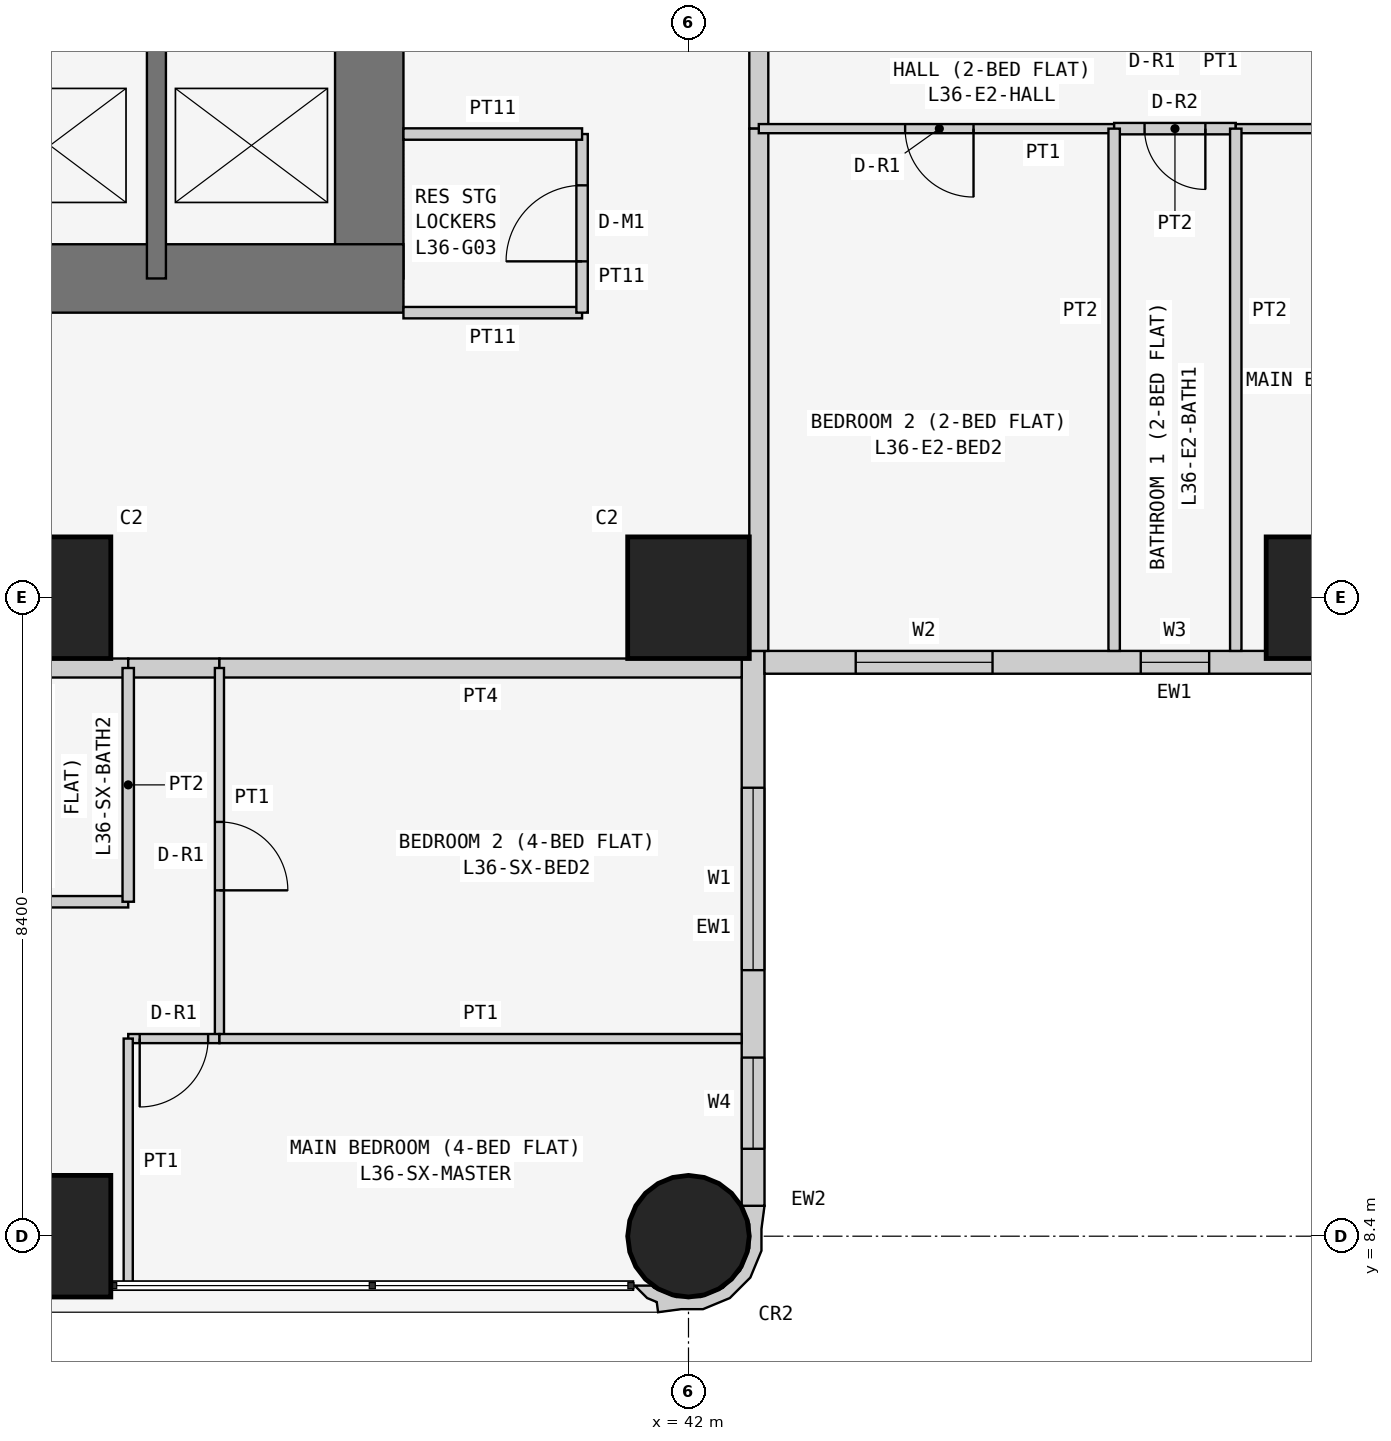
"""IFC4 building model, lengths in metres.
Left out: names, types, materials, properties, quantities, classifications, styles, units other than length and angle.
Written with IfcOpenShell. Run it as: python <this file> out.ifc"""

import sys

from ifc_helpers import new_model, si_unit, direction, frame, frame_2d, origin, origin_2d, place, context, subcontext, project, spatial, polyline, rectangle, circle, outline, extrude, element, fill, save


model = new_model("IFC4")
c1 = context("Model", 3, precision=1e-05, world=origin(), true_north=direction((0.0, 1.0)))
c2 = subcontext(c1, "Body", "Model", "MODEL_VIEW")
j1 = project(units=[si_unit("LENGTHUNIT", "METRE"), si_unit("PLANEANGLEUNIT", "RADIAN")], contexts=[c1])
p1 = place(None, origin())
s1 = spatial("IfcSite", under=j1, at=p1, CompositionType="ELEMENT")
p2 = place(p1, origin())
s2 = spatial("IfcBuilding", under=s1, at=p2, CompositionType="ELEMENT")
p3 = place(p2, frame((0.0, 0.0, 141.3)))
s3 = spatial("IfcBuildingStorey", under=s2, at=p3, CompositionType="ELEMENT", Elevation=141.3)
for number, where, z_axis, x_axis in (
    (1, (33.6, 8.4, 0.0), (0.0, 0.0, 1.0), (1.0, 0.0, 0.0)),
    (2, (33.6, 16.8, 0.0), (0.0, 0.0, 1.0), (1.0, 0.0, 0.0)),
):
    element("IfcColumn", number, at=place(p3, frame(where, z_axis=z_axis, x_axis=x_axis)), inside=s3, PredefinedType="COLUMN", context=c2, shape_type="SweptSolid", body=[
        extrude(rectangle(XDim=1.6, YDim=1.6, at=origin_2d()), origin(), (0.0, 0.0, 1.0), 3.6),
    ])
p4 = place(p3, frame((42.0, 8.4, 0.0), z_axis=(0.0, 0.0, 1.0), x_axis=(1.0, 0.0, 0.0)))
e3 = element("IfcColumn", 3, at=p4, inside=s3, PredefinedType="COLUMN", context=c2, shape_type="SweptSolid", body=[
    extrude(circle(Radius=0.8, at=origin_2d()), origin(), (0.0, 0.0, 1.0), 3.6),
])
for number, where, z_axis, x_axis in (
    (4, (42.0, 16.8, 0.0), (0.0, 0.0, 1.0), (1.0, 0.0, 0.0)),
    (5, (50.4, 16.8, 0.0), (0.0, 0.0, 1.0), (1.0, 0.0, 0.0)),
):
    element("IfcColumn", number, at=place(p3, frame(where, z_axis=z_axis, x_axis=x_axis)), inside=s3, PredefinedType="COLUMN", context=c2, shape_type="SweptSolid", body=[
        extrude(rectangle(XDim=1.6, YDim=1.6, at=origin_2d()), origin(), (0.0, 0.0, 1.0), 3.6),
    ])
p5 = place(p3, frame((21.0, 21.0, 0.0), z_axis=(0.0, 0.0, 1.0), x_axis=(1.0, 0.0, 0.0)))
e6 = element("IfcWall", 6, at=p5, inside=s3, PredefinedType="SHEAR", context=c2, shape_type="SweptSolid", body=[
    extrude(rectangle(XDim=17.25, YDim=0.9, at=frame_2d((8.625, 0.0))), origin(), (0.0, 0.0, 1.0), 3.6),
])
p6 = place(p3, frame((37.8, 21.0, 0.0), z_axis=(0.0, 0.0, 1.0), x_axis=(0.0, 1.0, 0.0)))
e7 = element("IfcWall", 7, at=p6, inside=s3, PredefinedType="SHEAR", context=c2, shape_type="SweptSolid", body=[
    extrude(rectangle(XDim=17.25, YDim=0.9, at=frame_2d((8.625, 0.0))), origin(), (0.0, 0.0, 1.0), 3.6),
])
p7 = place(p6, frame((5.2, 0.0, 0.0)))
e8 = element("IfcOpeningElement", 8, at=p7, cuts=e7, PredefinedType="OPENING", context=c2, shape_type="SweptSolid", body=[
    extrude(rectangle(XDim=1.2, YDim=2.1, at=frame_2d((0.6, 1.05))), frame((0.0, 0.46, 0.0), z_axis=(0.0, -1.0, 0.0), x_axis=(1.0, 0.0, 0.0)), (0.0, 0.0, 1.0), 0.92),
])
p8 = place(p3, frame((35.0, 21.0, 0.0), z_axis=(0.0, 0.0, 1.0), x_axis=(0.0, 1.0, 0.0)))
e9 = element("IfcWall", 9, at=p8, inside=s3, PredefinedType="SHEAR", context=c2, shape_type="SweptSolid", body=[
    extrude(rectangle(XDim=3.2, YDim=0.25, at=frame_2d((1.6, 0.0))), origin(), (0.0, 0.0, 1.0), 3.6),
])
p9 = place(p3, frame((42.85, 8.8, 0.0), z_axis=(0.0, 0.0, 1.0), x_axis=(0.0, 1.0, 0.0)))
e10 = element("IfcWall", 10, at=p9, inside=s3, PredefinedType="SOLIDWALL", context=c2, shape_type="SweptSolid", body=[
    extrude(rectangle(XDim=7.3, YDim=0.3, at=frame_2d((3.65, 0.0))), origin(), (0.0, 0.0, 1.0), 3.45),
])
p10 = place(p9, frame((3.1, 0.0, 0.9)))
e11 = element("IfcOpeningElement", 11, at=p10, cuts=e10, PredefinedType="OPENING", context=c2, shape_type="SweptSolid", body=[
    extrude(rectangle(XDim=2.4, YDim=1.5, at=frame_2d((1.2, 0.75))), frame((0.0, 0.16, 0.0), z_axis=(0.0, -1.0, 0.0), x_axis=(1.0, 0.0, 0.0)), (0.0, 0.0, 1.0), 0.32),
])
p11 = place(p9, frame((0.75, 0.0, 0.9)))
e12 = element("IfcOpeningElement", 12, at=p11, cuts=e10, PredefinedType="OPENING", context=c2, shape_type="SweptSolid", body=[
    extrude(rectangle(XDim=1.2, YDim=1.5, at=frame_2d((0.6, 0.75))), frame((0.0, 0.16, 0.0), z_axis=(0.0, -1.0, 0.0), x_axis=(1.0, 0.0, 0.0)), (0.0, 0.0, 1.0), 0.32),
])
p12 = place(p3, frame((43.0, 15.95, 0.0), z_axis=(0.0, 0.0, 1.0), x_axis=(1.0, 0.0, 0.0)))
e13 = element("IfcWall", 13, at=p12, inside=s3, PredefinedType="SOLIDWALL", context=c2, shape_type="SweptSolid", body=[
    extrude(rectangle(XDim=15.4, YDim=0.3, at=frame_2d((7.7, 0.0))), origin(), (0.0, 0.0, 1.0), 3.45),
])
p13 = place(p12, frame((1.2, 0.0, 0.9)))
e14 = element("IfcOpeningElement", 14, at=p13, cuts=e13, PredefinedType="OPENING", context=c2, shape_type="SweptSolid", body=[
    extrude(rectangle(XDim=1.8, YDim=1.5, at=frame_2d((0.9, 0.75))), frame((0.0, 0.16, 0.0), z_axis=(0.0, -1.0, 0.0), x_axis=(1.0, 0.0, 0.0)), (0.0, 0.0, 1.0), 0.32),
])
p14 = place(p12, frame((4.95, 0.0, 1.5)))
e15 = element("IfcOpeningElement", 15, at=p14, cuts=e13, PredefinedType="OPENING", context=c2, shape_type="SweptSolid", body=[
    extrude(rectangle(XDim=0.9, YDim=0.7, at=frame_2d((0.45, 0.35))), frame((0.0, 0.16, 0.0), z_axis=(0.0, -1.0, 0.0), x_axis=(1.0, 0.0, 0.0)), (0.0, 0.0, 1.0), 0.32),
])
p15 = place(p12, frame((8.5, 0.0, 0.9)))
e16 = element("IfcOpeningElement", 16, at=p15, cuts=e13, PredefinedType="OPENING", context=c2, shape_type="SweptSolid", body=[
    extrude(rectangle(XDim=1.8, YDim=1.5, at=frame_2d((0.9, 0.75))), frame((0.0, 0.16, 0.0), z_axis=(0.0, -1.0, 0.0), x_axis=(1.0, 0.0, 0.0)), (0.0, 0.0, 1.0), 0.32),
])
p16 = place(p12, frame((12.5, 0.0, 0.0)))
e17 = element("IfcOpeningElement", 17, at=p16, cuts=e13, PredefinedType="OPENING", context=c2, shape_type="SweptSolid", body=[
    extrude(rectangle(XDim=0.9, YDim=2.4, at=frame_2d((0.45, 1.2))), frame((0.0, 0.16, 0.0), z_axis=(0.0, -1.0, 0.0), x_axis=(1.0, 0.0, 0.0)), (0.0, 0.0, 1.0), 0.32),
])
p17 = place(p12, frame((13.5, 0.0, 0.9)))
e18 = element("IfcOpeningElement", 18, at=p17, cuts=e13, PredefinedType="OPENING", context=c2, shape_type="SweptSolid", body=[
    extrude(rectangle(XDim=1.2, YDim=1.5, at=frame_2d((0.6, 0.75))), frame((0.0, 0.16, 0.0), z_axis=(0.0, -1.0, 0.0), x_axis=(1.0, 0.0, 0.0)), (0.0, 0.0, 1.0), 0.32),
])
p18 = place(p3, frame((41.352, 7.805, 0.0), z_axis=(0.0, 0.0, 1.0), x_axis=(0.343276641956, -0.93923434088, 0.0)))
e19 = element("IfcWall", 19, at=p18, inside=s3, PredefinedType="SOLIDWALL", context=c2, shape_type="SweptSolid", body=[
    extrude(outline(polyline([(-0.369, 1.89), (-0.509, 1.621), (-0.49, 1.615), (-0.479, 1.609), (-0.211, 1.62), (0.088, 1.511), (0.323, 1.295), (0.457, 1.006), (0.47, 0.688), (0.361, 0.389), (0.145, 0.154), (0.108, 0.136), (0.031, -0.075), (0.241, 0.023), (0.333, 0.124), (0.465, 0.094), (0.532, 0.393), (0.631, 0.663), (0.614, 1.044), (0.453, 1.391), (0.172, 1.649), (-0.097, 1.748), (-0.369, 1.89)])), origin(), (0.0, 0.0, 1.0), 3.45),
])
p19 = place(p3, frame((38.25, 20.55, 0.0), z_axis=(0.0, 0.0, 1.0), x_axis=(1.0, 0.0, 0.0)))
e20 = element("IfcWall", 20, at=p19, inside=s3, PredefinedType="PARTITIONING", context=c2, shape_type="SweptSolid", body=[
    extrude(rectangle(XDim=2.35, YDim=0.15, at=frame_2d((1.175, 0.0))), origin(), (0.0, 0.0, 1.0), 3.45),
])
p20 = place(p3, frame((40.6, 20.55, 0.0), z_axis=(0.0, 0.0, 1.0), x_axis=(0.0, 1.0, 0.0)))
e21 = element("IfcWall", 21, at=p20, inside=s3, PredefinedType="PARTITIONING", context=c2, shape_type="SweptSolid", body=[
    extrude(rectangle(XDim=2.35, YDim=0.15, at=frame_2d((1.175, 0.0))), origin(), (0.0, 0.0, 1.0), 3.45),
])
p21 = place(p20, frame((0.675, 0.0, 0.0)))
e22 = element("IfcOpeningElement", 22, at=p21, cuts=e21, PredefinedType="OPENING", context=c2, shape_type="SweptSolid", body=[
    extrude(rectangle(XDim=1.0, YDim=2.1, at=frame_2d((0.5, 1.05))), frame((0.0, 0.085, 0.0), z_axis=(0.0, -1.0, 0.0), x_axis=(1.0, 0.0, 0.0)), (0.0, 0.0, 1.0), 0.17),
])
p22 = place(p3, frame((40.6, 22.9, 0.0), z_axis=(0.0, 0.0, 1.0), x_axis=(-1.0, 0.0, 0.0)))
e23 = element("IfcWall", 23, at=p22, inside=s3, PredefinedType="PARTITIONING", context=c2, shape_type="SweptSolid", body=[
    extrude(rectangle(XDim=2.35, YDim=0.15, at=frame_2d((1.175, 0.0))), origin(), (0.0, 0.0, 1.0), 3.45),
])
p23 = place(p3, frame((42.925, 24.171, 0.0), z_axis=(0.0, 0.0, 1.0), x_axis=(0.0, -1.0, 0.0)))
e24 = element("IfcWall", 24, at=p23, inside=s3, PredefinedType="PARTITIONING", context=c2, shape_type="SweptSolid", body=[
    extrude(rectangle(XDim=1.2, YDim=0.25, at=frame_2d((0.6, 0.0))), origin(), (0.0, 0.0, 1.0), 3.45),
])
p24 = place(p3, frame((42.925, 22.971, 0.0), z_axis=(0.0, 0.0, 1.0), x_axis=(0.0, -1.0, 0.0)))
e25 = element("IfcWall", 25, at=p24, inside=s3, PredefinedType="PARTITIONING", context=c2, shape_type="SweptSolid", body=[
    extrude(rectangle(XDim=6.871, YDim=0.25, at=frame_2d((3.436, 0.0))), origin(), (0.0, 0.0, 1.0), 3.45),
])
p25 = place(p3, frame((34.629, 15.875, 0.0), z_axis=(0.0, 0.0, 1.0), x_axis=(-1.0, 0.0, 0.0)))
e26 = element("IfcWall", 26, at=p25, inside=s3, PredefinedType="PARTITIONING", context=c2, shape_type="SweptSolid", body=[
    extrude(rectangle(XDim=2.629, YDim=0.25, at=frame_2d((1.314, 0.0))), origin(), (0.0, 0.0, 1.0), 3.45),
])
p26 = place(p3, frame((35.829, 15.875, 0.0), z_axis=(0.0, 0.0, 1.0), x_axis=(-1.0, 0.0, 0.0)))
e27 = element("IfcWall", 27, at=p26, inside=s3, PredefinedType="PARTITIONING", context=c2, shape_type="SweptSolid", body=[
    extrude(rectangle(XDim=1.2, YDim=0.25, at=frame_2d((0.6, 0.0))), origin(), (0.0, 0.0, 1.0), 3.45),
])
p27 = place(p3, frame((42.7, 15.875, 0.0), z_axis=(0.0, 0.0, 1.0), x_axis=(-1.0, 0.0, 0.0)))
e28 = element("IfcWall", 28, at=p27, inside=s3, PredefinedType="PARTITIONING", context=c2, shape_type="SweptSolid", body=[
    extrude(rectangle(XDim=6.871, YDim=0.25, at=frame_2d((3.436, 0.0))), origin(), (0.0, 0.0, 1.0), 3.45),
])
p28 = place(p3, frame((47.6, 22.971, 0.0), z_axis=(0.0, 0.0, 1.0), x_axis=(-1.0, 0.0, 0.0)))
e29 = element("IfcWall", 29, at=p28, inside=s3, PredefinedType="PARTITIONING", context=c2, shape_type="SweptSolid", body=[
    extrude(rectangle(XDim=4.675, YDim=0.12, at=frame_2d((2.337, 0.0))), origin(), (0.0, 0.0, 1.0), 3.45),
])
p29 = place(p28, frame((1.85, 0.0, 0.0)))
e30 = element("IfcOpeningElement", 30, at=p29, cuts=e29, PredefinedType="OPENING", context=c2, shape_type="SweptSolid", body=[
    extrude(rectangle(XDim=0.9, YDim=2.1, at=frame_2d((0.45, 1.05))), frame((0.0, 0.07, 0.0), z_axis=(0.0, -1.0, 0.0), x_axis=(1.0, 0.0, 0.0)), (0.0, 0.0, 1.0), 0.14),
])
p30 = place(p3, frame((49.2, 22.971, 0.0), z_axis=(0.0, 0.0, 1.0), x_axis=(-1.0, 0.0, 0.0)))
e31 = element("IfcWall", 31, at=p30, inside=s3, PredefinedType="PARTITIONING", context=c2, shape_type="SweptSolid", body=[
    extrude(rectangle(XDim=1.6, YDim=0.15, at=frame_2d((0.8, 0.0))), origin(), (0.0, 0.0, 1.0), 3.45),
])
p31 = place(p30, frame((0.4, 0.0, 0.0)))
e32 = element("IfcOpeningElement", 32, at=p31, cuts=e31, PredefinedType="OPENING", context=c2, shape_type="SweptSolid", body=[
    extrude(rectangle(XDim=0.8, YDim=2.1, at=frame_2d((0.4, 1.05))), frame((0.0, 0.085, 0.0), z_axis=(0.0, -1.0, 0.0), x_axis=(1.0, 0.0, 0.0)), (0.0, 0.0, 1.0), 0.17),
])
p32 = place(p3, frame((53.0, 22.971, 0.0), z_axis=(0.0, 0.0, 1.0), x_axis=(-1.0, 0.0, 0.0)))
e33 = element("IfcWall", 33, at=p32, inside=s3, PredefinedType="PARTITIONING", context=c2, shape_type="SweptSolid", body=[
    extrude(rectangle(XDim=3.8, YDim=0.12, at=frame_2d((1.9, 0.0))), origin(), (0.0, 0.0, 1.0), 3.45),
])
p33 = place(p32, frame((0.55, 0.0, 0.0)))
e34 = element("IfcOpeningElement", 34, at=p33, cuts=e33, PredefinedType="OPENING", context=c2, shape_type="SweptSolid", body=[
    extrude(rectangle(XDim=0.9, YDim=2.1, at=frame_2d((0.45, 1.05))), frame((0.0, 0.07, 0.0), z_axis=(0.0, -1.0, 0.0), x_axis=(1.0, 0.0, 0.0)), (0.0, 0.0, 1.0), 0.14),
])
for number, where, z_axis, x_axis in (
    (35, (47.6, 22.971, 0.0), (0.0, 0.0, 1.0), (0.0, -1.0, 0.0)),
    (36, (49.2, 22.971, 0.0), (0.0, 0.0, 1.0), (0.0, -1.0, 0.0)),
):
    element("IfcWall", number, at=place(p3, frame(where, z_axis=z_axis, x_axis=x_axis)), inside=s3, PredefinedType="PARTITIONING", context=c2, shape_type="SweptSolid", body=[
        extrude(rectangle(XDim=6.871, YDim=0.15, at=frame_2d((3.436, 0.0))), origin(), (0.0, 0.0, 1.0), 3.45),
    ])
p34 = place(p3, frame((32.0, 12.8, 0.0), z_axis=(0.0, 0.0, 1.0), x_axis=(1.0, 0.0, 0.0)))
e37 = element("IfcWall", 37, at=p34, inside=s3, PredefinedType="PARTITIONING", context=c2, shape_type="SweptSolid", body=[
    extrude(rectangle(XDim=2.629, YDim=0.15, at=frame_2d((1.314, 0.0))), origin(), (0.0, 0.0, 1.0), 3.45),
])
p35 = place(p3, frame((34.629, 12.8, 0.0), z_axis=(0.0, 0.0, 1.0), x_axis=(0.0, 1.0, 0.0)))
e38 = element("IfcWall", 38, at=p35, inside=s3, PredefinedType="PARTITIONING", context=c2, shape_type="SweptSolid", body=[
    extrude(rectangle(XDim=3.075, YDim=0.15, at=frame_2d((1.538, 0.0))), origin(), (0.0, 0.0, 1.0), 3.45),
])
p36 = place(p3, frame((35.829, 15.875, 0.0), z_axis=(0.0, 0.0, 1.0), x_axis=(0.0, -1.0, 0.0)))
e39 = element("IfcWall", 39, at=p36, inside=s3, PredefinedType="PARTITIONING", context=c2, shape_type="SweptSolid", body=[
    extrude(rectangle(XDim=4.875, YDim=0.12, at=frame_2d((2.438, 0.0))), origin(), (0.0, 0.0, 1.0), 3.45),
])
p37 = place(p36, frame((2.025, 0.0, 0.0)))
e40 = element("IfcOpeningElement", 40, at=p37, cuts=e39, PredefinedType="OPENING", context=c2, shape_type="SweptSolid", body=[
    extrude(rectangle(XDim=0.9, YDim=2.1, at=frame_2d((0.45, 1.05))), frame((0.0, 0.07, 0.0), z_axis=(0.0, -1.0, 0.0), x_axis=(1.0, 0.0, 0.0)), (0.0, 0.0, 1.0), 0.14),
])
p38 = place(p3, frame((35.829, 11.0, 0.0), z_axis=(0.0, 0.0, 1.0), x_axis=(-1.0, 0.0, 0.0)))
e41 = element("IfcWall", 41, at=p38, inside=s3, PredefinedType="PARTITIONING", context=c2, shape_type="SweptSolid", body=[
    extrude(rectangle(XDim=1.2, YDim=0.12, at=frame_2d((0.6, 0.0))), origin(), (0.0, 0.0, 1.0), 3.45),
])
p39 = place(p38, frame((0.149, 0.0, 0.0)))
e42 = element("IfcOpeningElement", 42, at=p39, cuts=e41, PredefinedType="OPENING", context=c2, shape_type="SweptSolid", body=[
    extrude(rectangle(XDim=0.9, YDim=2.1, at=frame_2d((0.45, 1.05))), frame((0.0, 0.07, 0.0), z_axis=(0.0, -1.0, 0.0), x_axis=(1.0, 0.0, 0.0)), (0.0, 0.0, 1.0), 0.14),
])
p40 = place(p3, frame((34.629, 11.0, 0.0), z_axis=(0.0, 0.0, 1.0), x_axis=(0.0, -1.0, 0.0)))
e43 = element("IfcWall", 43, at=p40, inside=s3, PredefinedType="PARTITIONING", context=c2, shape_type="SweptSolid", body=[
    extrude(rectangle(XDim=3.25, YDim=0.12, at=frame_2d((1.625, 0.0))), origin(), (0.0, 0.0, 1.0), 3.45),
])
p41 = place(p3, frame((35.829, 11.0, 0.0), z_axis=(0.0, 0.0, 1.0), x_axis=(1.0, 0.0, 0.0)))
e44 = element("IfcWall", 44, at=p41, inside=s3, PredefinedType="PARTITIONING", context=c2, shape_type="SweptSolid", body=[
    extrude(rectangle(XDim=6.871, YDim=0.12, at=frame_2d((3.436, 0.0))), origin(), (0.0, 0.0, 1.0), 3.45),
])
p42 = place(p13, origin())
e45 = element("IfcWindow", 45, at=p42, inside=s3, PartitioningType="SINGLE_PANEL", PredefinedType="WINDOW", context=c2, shape_type="SweptSolid", body=[
    extrude(rectangle(XDim=1.8, YDim=1.5, at=frame_2d((0.9, 0.75))), frame((0.0, 0.03, 0.0), z_axis=(0.0, -1.0, 0.0), x_axis=(1.0, 0.0, 0.0)), (0.0, 0.0, 1.0), 0.06),
])
fill(e14, e45)
p43 = place(p14, origin())
e46 = element("IfcWindow", 46, at=p43, inside=s3, PartitioningType="SINGLE_PANEL", PredefinedType="WINDOW", context=c2, shape_type="SweptSolid", body=[
    extrude(rectangle(XDim=0.9, YDim=0.7, at=frame_2d((0.45, 0.35))), frame((0.0, 0.03, 0.0), z_axis=(0.0, -1.0, 0.0), x_axis=(1.0, 0.0, 0.0)), (0.0, 0.0, 1.0), 0.06),
])
fill(e15, e46)
p44 = place(p10, origin())
e47 = element("IfcWindow", 47, at=p44, inside=s3, PartitioningType="SINGLE_PANEL", PredefinedType="WINDOW", context=c2, shape_type="SweptSolid", body=[
    extrude(rectangle(XDim=2.4, YDim=1.5, at=frame_2d((1.2, 0.75))), frame((0.0, 0.03, 0.0), z_axis=(0.0, -1.0, 0.0), x_axis=(1.0, 0.0, 0.0)), (0.0, 0.0, 1.0), 0.06),
])
fill(e11, e47)
p45 = place(p11, origin())
e48 = element("IfcWindow", 48, at=p45, inside=s3, PartitioningType="SINGLE_PANEL", PredefinedType="WINDOW", context=c2, shape_type="SweptSolid", body=[
    extrude(rectangle(XDim=1.2, YDim=1.5, at=frame_2d((0.6, 0.75))), frame((0.0, 0.03, 0.0), z_axis=(0.0, -1.0, 0.0), x_axis=(1.0, 0.0, 0.0)), (0.0, 0.0, 1.0), 0.06),
])
fill(e12, e48)
p46 = place(p21, origin())
e49 = element("IfcDoor", 49, at=p46, inside=s3, OperationType="SINGLE_SWING_LEFT", PredefinedType="DOOR", context=c2, shape_type="SweptSolid", body=[
    extrude(rectangle(XDim=1.0, YDim=2.1, at=frame_2d((0.5, 1.05))), frame((0.0, 0.025, 0.0), z_axis=(0.0, -1.0, 0.0), x_axis=(1.0, 0.0, 0.0)), (0.0, 0.0, 1.0), 0.05),
])
fill(e22, e49)
p47 = place(p29, origin())
e50 = element("IfcDoor", 50, at=p47, inside=s3, OperationType="SINGLE_SWING_LEFT", PredefinedType="DOOR", context=c2, shape_type="SweptSolid", body=[
    extrude(rectangle(XDim=0.9, YDim=2.1, at=frame_2d((0.45, 1.05))), frame((0.0, 0.025, 0.0), z_axis=(0.0, -1.0, 0.0), x_axis=(1.0, 0.0, 0.0)), (0.0, 0.0, 1.0), 0.05),
])
fill(e30, e50)
p48 = place(p31, origin())
e51 = element("IfcDoor", 51, at=p48, inside=s3, OperationType="SINGLE_SWING_LEFT", PredefinedType="DOOR", context=c2, shape_type="SweptSolid", body=[
    extrude(rectangle(XDim=0.8, YDim=2.1, at=frame_2d((0.4, 1.05))), frame((0.0, 0.025, 0.0), z_axis=(0.0, -1.0, 0.0), x_axis=(1.0, 0.0, 0.0)), (0.0, 0.0, 1.0), 0.05),
])
fill(e32, e51)
p49 = place(p37, origin())
e52 = element("IfcDoor", 52, at=p49, inside=s3, OperationType="SINGLE_SWING_RIGHT", PredefinedType="DOOR", context=c2, shape_type="SweptSolid", body=[
    extrude(rectangle(XDim=0.9, YDim=2.1, at=frame_2d((0.45, 1.05))), frame((0.0, 0.025, 0.0), z_axis=(0.0, -1.0, 0.0), x_axis=(1.0, 0.0, 0.0)), (0.0, 0.0, 1.0), 0.05),
])
fill(e40, e52)
p50 = place(p39, origin())
e53 = element("IfcDoor", 53, at=p50, inside=s3, OperationType="SINGLE_SWING_RIGHT", PredefinedType="DOOR", context=c2, shape_type="SweptSolid", body=[
    extrude(rectangle(XDim=0.9, YDim=2.1, at=frame_2d((0.45, 1.05))), frame((0.0, 0.025, 0.0), z_axis=(0.0, -1.0, 0.0), x_axis=(1.0, 0.0, 0.0)), (0.0, 0.0, 1.0), 0.05),
])
fill(e42, e53)
save(model, sys.argv[1])
